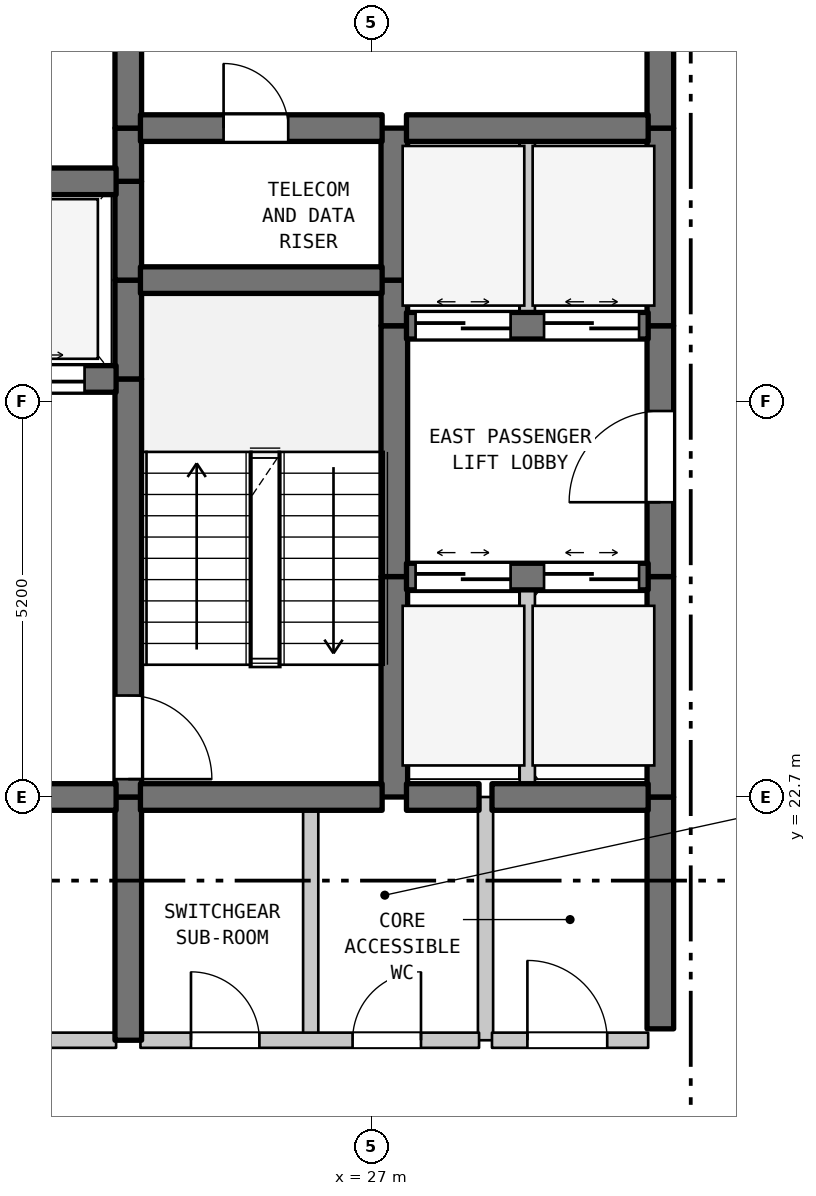
"""IFC4 building model, lengths in metres.
Left out: names, types, materials, properties, quantities, classifications, styles, units other than length and angle.
Written with IfcOpenShell. Run it as: python <this file> out.ifc"""

import sys

from ifc_helpers import new_model, si_unit, direction, frame, frame_2d, origin, place, context, subcontext, project, spatial, rectangle, extrude, element, fill, save


model = new_model("IFC4")
c1 = context("Model", 3, precision=1e-05, world=origin(), true_north=direction((0.0, 1.0)))
c2 = subcontext(c1, "Body", "Model", "MODEL_VIEW")
j1 = project(units=[si_unit("LENGTHUNIT", "METRE"), si_unit("PLANEANGLEUNIT", "RADIAN")], contexts=[c1])
p1 = place(None, origin())
s1 = spatial("IfcSite", under=j1, at=p1, CompositionType="ELEMENT")
p2 = place(p1, origin())
s2 = spatial("IfcBuilding", under=s1, at=p2, CompositionType="ELEMENT")
p3 = place(p2, frame((0.0, 0.0, 38.8)))
s3 = spatial("IfcBuildingStorey", under=s2, at=p3, CompositionType="ELEMENT", Elevation=38.8)
p4 = place(p3, frame((23.8, 19.5, 0.0), z_axis=(0.0, 0.0, 1.0), x_axis=(0.0, 1.0, 0.0)))
e1 = element("IfcWall", 1, at=p4, inside=s3, PredefinedType="SHEAR", context=c2, shape_type="SweptSolid", body=[
    extrude(rectangle(XDim=3.2, YDim=0.35, at=frame_2d((1.6, 0.0))), origin(), (0.0, 0.0, 1.0), 3.385),
])
p5 = place(p3, frame((23.8, 22.7, 0.0), z_axis=(0.0, 0.0, 1.0), x_axis=(0.0, 1.0, 0.0)))
e2 = element("IfcWall", 2, at=p5, inside=s3, PredefinedType="SHEAR", context=c2, shape_type="SweptSolid", body=[
    extrude(rectangle(XDim=5.5, YDim=0.35, at=frame_2d((2.75, 0.0))), origin(), (0.0, 0.0, 1.0), 3.385),
])
p6 = place(p5, frame((0.235, 0.0, 0.0)))
e3 = element("IfcOpeningElement", 3, at=p6, cuts=e2, PredefinedType="OPENING", context=c2, shape_type="SweptSolid", body=[
    extrude(rectangle(XDim=1.1, YDim=2.15, at=frame_2d((0.55, 1.075))), frame((0.0, 0.185, 0.0), z_axis=(0.0, -1.0, 0.0), x_axis=(1.0, 0.0, 0.0)), (0.0, 0.0, 1.0), 0.37),
])
for number, where, z_axis, x_axis in (
    (4, (23.8, 28.2, 0.0), (0.0, 0.0, 1.0), (0.0, 1.0, 0.0)),
    (5, (23.8, 29.5, 0.0), (0.0, 0.0, 1.0), (0.0, 1.0, 0.0)),
):
    element("IfcWall", number, at=place(p3, frame(where, z_axis=z_axis, x_axis=x_axis)), inside=s3, PredefinedType="SHEAR", context=c2, shape_type="SweptSolid", body=[
        extrude(rectangle(XDim=1.3, YDim=0.35, at=frame_2d((0.65, 0.0))), origin(), (0.0, 0.0, 1.0), 3.385),
    ])
p7 = place(p3, frame((23.8, 30.8, 0.0), z_axis=(0.0, 0.0, 1.0), x_axis=(0.0, 1.0, 0.0)))
e6 = element("IfcWall", 6, at=p7, inside=s3, PredefinedType="SHEAR", context=c2, shape_type="SweptSolid", body=[
    extrude(rectangle(XDim=0.7, YDim=0.35, at=frame_2d((0.35, 0.0))), origin(), (0.0, 0.0, 1.0), 3.385),
])
p8 = place(p3, frame((23.8, 31.5, 0.0), z_axis=(0.0, 0.0, 1.0), x_axis=(0.0, 1.0, 0.0)))
e7 = element("IfcWall", 7, at=p8, inside=s3, PredefinedType="SHEAR", context=c2, shape_type="SweptSolid", body=[
    extrude(rectangle(XDim=3.5, YDim=0.35, at=frame_2d((1.75, 0.0))), origin(), (0.0, 0.0, 1.0), 3.385),
])
p9 = place(p8, frame((1.127, 0.0, 0.0)))
e8 = element("IfcOpeningElement", 8, at=p9, cuts=e7, PredefinedType="OPENING", context=c2, shape_type="SweptSolid", body=[
    extrude(rectangle(XDim=1.1, YDim=2.15, at=frame_2d((0.55, 1.075))), frame((0.0, 0.185, 0.0), z_axis=(0.0, -1.0, 0.0), x_axis=(1.0, 0.0, 0.0)), (0.0, 0.0, 1.0), 0.37),
])
p10 = place(p3, frame((26.2, 19.5, 0.0), z_axis=(0.0, 0.0, 1.0), x_axis=(0.0, 1.0, 0.0)))
e9 = element("IfcWall", 9, at=p10, inside=s3, PredefinedType="STANDARD", context=c2, shape_type="SweptSolid", body=[
    extrude(rectangle(XDim=3.2, YDim=0.2, at=frame_2d((1.6, 0.0))), origin(), (0.0, 0.0, 1.0), 3.385),
])
p11 = place(p3, frame((27.3, 22.7, 0.0), z_axis=(0.0, 0.0, 1.0), x_axis=(0.0, 1.0, 0.0)))
e10 = element("IfcWall", 10, at=p11, inside=s3, PredefinedType="SHEAR", context=c2, shape_type="SweptSolid", body=[
    extrude(rectangle(XDim=2.9, YDim=0.35, at=frame_2d((1.45, 0.0))), origin(), (0.0, 0.0, 1.0), 3.385),
])
p12 = place(p3, frame((27.3, 25.6, 0.0), z_axis=(0.0, 0.0, 1.0), x_axis=(0.0, 1.0, 0.0)))
e11 = element("IfcWall", 11, at=p12, inside=s3, PredefinedType="SHEAR", context=c2, shape_type="SweptSolid", body=[
    extrude(rectangle(XDim=3.3, YDim=0.35, at=frame_2d((1.65, 0.0))), origin(), (0.0, 0.0, 1.0), 3.385),
])
p13 = place(p3, frame((27.3, 28.9, 0.0), z_axis=(0.0, 0.0, 1.0), x_axis=(0.0, 1.0, 0.0)))
e12 = element("IfcWall", 12, at=p13, inside=s3, PredefinedType="SHEAR", context=c2, shape_type="SweptSolid", body=[
    extrude(rectangle(XDim=0.6, YDim=0.35, at=frame_2d((0.3, 0.0))), origin(), (0.0, 0.0, 1.0), 3.385),
])
p14 = place(p3, frame((27.3, 29.5, 0.0), z_axis=(0.0, 0.0, 1.0), x_axis=(0.0, 1.0, 0.0)))
e13 = element("IfcWall", 13, at=p14, inside=s3, PredefinedType="SHEAR", context=c2, shape_type="SweptSolid", body=[
    extrude(rectangle(XDim=2.0, YDim=0.35, at=frame_2d((1.0, 0.0))), origin(), (0.0, 0.0, 1.0), 3.385),
])
p15 = place(p3, frame((28.5, 19.5, 0.0), z_axis=(0.0, 0.0, 1.0), x_axis=(0.0, 1.0, 0.0)))
e14 = element("IfcWall", 14, at=p15, inside=s3, PredefinedType="STANDARD", context=c2, shape_type="SweptSolid", body=[
    extrude(rectangle(XDim=3.2, YDim=0.2, at=frame_2d((1.6, 0.0))), origin(), (0.0, 0.0, 1.0), 3.385),
])
p16 = place(p3, frame((29.05, 22.7, 0.0), z_axis=(0.0, 0.0, 1.0), x_axis=(0.0, 1.0, 0.0)))
e15 = element("IfcWall", 15, at=p16, inside=s3, PredefinedType="STANDARD", context=c2, shape_type="SweptSolid", body=[
    extrude(rectangle(XDim=2.9, YDim=0.2, at=frame_2d((1.45, 0.0))), origin(), (0.0, 0.0, 1.0), 3.385),
])
p17 = place(p3, frame((29.05, 28.9, 0.0), z_axis=(0.0, 0.0, 1.0), x_axis=(0.0, 1.0, 0.0)))
e16 = element("IfcWall", 16, at=p17, inside=s3, PredefinedType="STANDARD", context=c2, shape_type="SweptSolid", body=[
    extrude(rectangle(XDim=2.6, YDim=0.2, at=frame_2d((1.3, 0.0))), origin(), (0.0, 0.0, 1.0), 3.385),
])
p18 = place(p3, frame((30.8, 19.65, 0.0), z_axis=(0.0, 0.0, 1.0), x_axis=(0.0, 1.0, 0.0)))
e17 = element("IfcWall", 17, at=p18, inside=s3, PredefinedType="SHEAR", context=c2, shape_type="SweptSolid", body=[
    extrude(rectangle(XDim=3.05, YDim=0.35, at=frame_2d((1.525, 0.0))), origin(), (0.0, 0.0, 1.0), 3.385),
])
p19 = place(p3, frame((30.8, 22.7, 0.0), z_axis=(0.0, 0.0, 1.0), x_axis=(0.0, 1.0, 0.0)))
e18 = element("IfcWall", 18, at=p19, inside=s3, PredefinedType="SHEAR", context=c2, shape_type="SweptSolid", body=[
    extrude(rectangle(XDim=2.9, YDim=0.35, at=frame_2d((1.45, 0.0))), origin(), (0.0, 0.0, 1.0), 3.385),
])
p20 = place(p3, frame((30.8, 25.6, 0.0), z_axis=(0.0, 0.0, 1.0), x_axis=(0.0, 1.0, 0.0)))
e19 = element("IfcWall", 19, at=p20, inside=s3, PredefinedType="SHEAR", context=c2, shape_type="SweptSolid", body=[
    extrude(rectangle(XDim=3.3, YDim=0.35, at=frame_2d((1.65, 0.0))), origin(), (0.0, 0.0, 1.0), 3.385),
])
p21 = place(p20, frame((0.978, 0.0, 0.0)))
e20 = element("IfcOpeningElement", 20, at=p21, cuts=e19, PredefinedType="OPENING", context=c2, shape_type="SweptSolid", body=[
    extrude(rectangle(XDim=1.2, YDim=2.2, at=frame_2d((0.6, 1.1))), frame((0.0, 0.185, 0.0), z_axis=(0.0, -1.0, 0.0), x_axis=(1.0, 0.0, 0.0)), (0.0, 0.0, 1.0), 0.37),
])
p22 = place(p3, frame((30.8, 28.9, 0.0), z_axis=(0.0, 0.0, 1.0), x_axis=(0.0, 1.0, 0.0)))
e21 = element("IfcWall", 21, at=p22, inside=s3, PredefinedType="SHEAR", context=c2, shape_type="SweptSolid", body=[
    extrude(rectangle(XDim=2.6, YDim=0.35, at=frame_2d((1.3, 0.0))), origin(), (0.0, 0.0, 1.0), 3.385),
])
p23 = place(p3, frame((30.8, 31.5, 0.0), z_axis=(0.0, 0.0, 1.0), x_axis=(0.0, 1.0, 0.0)))
e22 = element("IfcWall", 22, at=p23, inside=s3, PredefinedType="SHEAR", context=c2, shape_type="SweptSolid", body=[
    extrude(rectangle(XDim=3.5, YDim=0.35, at=frame_2d((1.75, 0.0))), origin(), (0.0, 0.0, 1.0), 3.385),
])
p24 = place(p23, frame((1.15, 0.0, 0.0)))
e23 = element("IfcOpeningElement", 23, at=p24, cuts=e22, PredefinedType="OPENING", context=c2, shape_type="SweptSolid", body=[
    extrude(rectangle(XDim=1.2, YDim=2.2, at=frame_2d((0.6, 1.1))), frame((0.0, 0.185, 0.0), z_axis=(0.0, -1.0, 0.0), x_axis=(1.0, 0.0, 0.0)), (0.0, 0.0, 1.0), 0.37),
])
p25 = place(p3, frame((19.16, 19.5, 0.0), z_axis=(0.0, 0.0, 1.0), x_axis=(1.0, 0.0, 0.0)))
e24 = element("IfcWall", 24, at=p25, inside=s3, PredefinedType="STANDARD", context=c2, shape_type="SweptSolid", body=[
    extrude(rectangle(XDim=4.48, YDim=0.2, at=frame_2d((2.24, 0.0))), origin(), (0.0, 0.0, 1.0), 3.385),
])
p26 = place(p25, frame((1.64, 0.0, 0.0)))
e25 = element("IfcOpeningElement", 25, at=p26, cuts=e24, PredefinedType="OPENING", context=c2, shape_type="SweptSolid", body=[
    extrude(rectangle(XDim=1.2, YDim=2.2, at=frame_2d((0.6, 1.1))), frame((0.0, 0.11, 0.0), z_axis=(0.0, -1.0, 0.0), x_axis=(1.0, 0.0, 0.0)), (0.0, 0.0, 1.0), 0.22),
])
p27 = place(p3, frame((23.96, 19.5, 0.0), z_axis=(0.0, 0.0, 1.0), x_axis=(1.0, 0.0, 0.0)))
e26 = element("IfcWall", 26, at=p27, inside=s3, PredefinedType="STANDARD", context=c2, shape_type="SweptSolid", body=[
    extrude(rectangle(XDim=4.455, YDim=0.2, at=frame_2d((2.228, 0.0))), origin(), (0.0, 0.0, 1.0), 3.385),
])
p28 = place(p27, frame((0.665, 0.0, 0.0)))
e27 = element("IfcOpeningElement", 27, at=p28, cuts=e26, PredefinedType="OPENING", context=c2, shape_type="SweptSolid", body=[
    extrude(rectangle(XDim=0.9, YDim=2.15, at=frame_2d((0.45, 1.075))), frame((0.0, 0.11, 0.0), z_axis=(0.0, -1.0, 0.0), x_axis=(1.0, 0.0, 0.0)), (0.0, 0.0, 1.0), 0.22),
])
p29 = place(p27, frame((2.791, 0.0, 0.0)))
e28 = element("IfcOpeningElement", 28, at=p29, cuts=e26, PredefinedType="OPENING", context=c2, shape_type="SweptSolid", body=[
    extrude(rectangle(XDim=0.9, YDim=2.15, at=frame_2d((0.45, 1.075))), frame((0.0, 0.11, 0.0), z_axis=(0.0, -1.0, 0.0), x_axis=(1.0, 0.0, 0.0)), (0.0, 0.0, 1.0), 0.22),
])
p30 = place(p3, frame((28.585, 19.5, 0.0), z_axis=(0.0, 0.0, 1.0), x_axis=(1.0, 0.0, 0.0)))
e29 = element("IfcWall", 29, at=p30, inside=s3, PredefinedType="STANDARD", context=c2, shape_type="SweptSolid", body=[
    extrude(rectangle(XDim=2.055, YDim=0.2, at=frame_2d((1.027, 0.0))), origin(), (0.0, 0.0, 1.0), 3.385),
])
p31 = place(p30, frame((0.466, 0.0, 0.0)))
e30 = element("IfcOpeningElement", 30, at=p31, cuts=e29, PredefinedType="OPENING", context=c2, shape_type="SweptSolid", body=[
    extrude(rectangle(XDim=1.05, YDim=2.15, at=frame_2d((0.525, 1.075))), frame((0.0, 0.11, 0.0), z_axis=(0.0, -1.0, 0.0), x_axis=(1.0, 0.0, 0.0)), (0.0, 0.0, 1.0), 0.22),
])
p32 = place(p3, frame((19.16, 22.7, 0.0), z_axis=(0.0, 0.0, 1.0), x_axis=(1.0, 0.0, 0.0)))
e31 = element("IfcWall", 31, at=p32, inside=s3, PredefinedType="SHEAR", context=c2, shape_type="SweptSolid", body=[
    extrude(rectangle(XDim=4.48, YDim=0.35, at=frame_2d((2.24, 0.0))), origin(), (0.0, 0.0, 1.0), 3.385),
])
p33 = place(p32, frame((1.64, 0.0, 0.0)))
e32 = element("IfcOpeningElement", 32, at=p33, cuts=e31, PredefinedType="OPENING", context=c2, shape_type="SweptSolid", body=[
    extrude(rectangle(XDim=1.2, YDim=2.2, at=frame_2d((0.6, 1.1))), frame((0.0, 0.185, 0.0), z_axis=(0.0, -1.0, 0.0), x_axis=(1.0, 0.0, 0.0)), (0.0, 0.0, 1.0), 0.37),
])
p34 = place(p3, frame((23.96, 22.7, 0.0), z_axis=(0.0, 0.0, 1.0), x_axis=(1.0, 0.0, 0.0)))
e33 = element("IfcWall", 33, at=p34, inside=s3, PredefinedType="SHEAR", context=c2, shape_type="SweptSolid", body=[
    extrude(rectangle(XDim=3.18, YDim=0.35, at=frame_2d((1.59, 0.0))), origin(), (0.0, 0.0, 1.0), 3.385),
])
p35 = place(p3, frame((27.46, 22.7, 0.0), z_axis=(0.0, 0.0, 1.0), x_axis=(1.0, 0.0, 0.0)))
e34 = element("IfcWall", 34, at=p35, inside=s3, PredefinedType="SHEAR", context=c2, shape_type="SweptSolid", body=[
    extrude(rectangle(XDim=0.955, YDim=0.35, at=frame_2d((0.478, 0.0))), origin(), (0.0, 0.0, 1.0), 3.385),
])
p36 = place(p3, frame((28.585, 22.7, 0.0), z_axis=(0.0, 0.0, 1.0), x_axis=(1.0, 0.0, 0.0)))
e35 = element("IfcWall", 35, at=p36, inside=s3, PredefinedType="SHEAR", context=c2, shape_type="SweptSolid", body=[
    extrude(rectangle(XDim=2.055, YDim=0.35, at=frame_2d((1.027, 0.0))), origin(), (0.0, 0.0, 1.0), 3.385),
])
p37 = place(p3, frame((27.46, 25.6, 0.0), z_axis=(0.0, 0.0, 1.0), x_axis=(1.0, 0.0, 0.0)))
e36 = element("IfcWall", 36, at=p37, inside=s3, PredefinedType="SHEAR", context=c2, shape_type="SweptSolid", body=[
    extrude(rectangle(XDim=3.18, YDim=0.35, at=frame_2d((1.59, 0.0))), origin(), (0.0, 0.0, 1.0), 3.385),
])
p38 = place(p37, frame((0.12, 0.0, 0.0)))
e37 = element("IfcOpeningElement", 37, at=p38, cuts=e36, PredefinedType="OPENING", context=c2, shape_type="SweptSolid", body=[
    extrude(rectangle(XDim=1.25, YDim=2.2, at=frame_2d((0.625, 1.1))), frame((0.0, 0.185, 0.0), z_axis=(0.0, -1.0, 0.0), x_axis=(1.0, 0.0, 0.0)), (0.0, 0.0, 1.0), 0.37),
])
p39 = place(p37, frame((1.81, 0.0, 0.0)))
e38 = element("IfcOpeningElement", 38, at=p39, cuts=e36, PredefinedType="OPENING", context=c2, shape_type="SweptSolid", body=[
    extrude(rectangle(XDim=1.25, YDim=2.2, at=frame_2d((0.625, 1.1))), frame((0.0, 0.185, 0.0), z_axis=(0.0, -1.0, 0.0), x_axis=(1.0, 0.0, 0.0)), (0.0, 0.0, 1.0), 0.37),
])
p40 = place(p3, frame((19.16, 28.2, 0.0), z_axis=(0.0, 0.0, 1.0), x_axis=(1.0, 0.0, 0.0)))
e39 = element("IfcWall", 39, at=p40, inside=s3, PredefinedType="SHEAR", context=c2, shape_type="SweptSolid", body=[
    extrude(rectangle(XDim=4.48, YDim=0.35, at=frame_2d((2.24, 0.0))), origin(), (0.0, 0.0, 1.0), 3.385),
])
p41 = place(p40, frame((0.415, 0.0, 0.0)))
e40 = element("IfcOpeningElement", 40, at=p41, cuts=e39, PredefinedType="OPENING", context=c2, shape_type="SweptSolid", body=[
    extrude(rectangle(XDim=1.25, YDim=2.2, at=frame_2d((0.625, 1.1))), frame((0.0, 0.185, 0.0), z_axis=(0.0, -1.0, 0.0), x_axis=(1.0, 0.0, 0.0)), (0.0, 0.0, 1.0), 0.37),
])
p42 = place(p40, frame((2.815, 0.0, 0.0)))
e41 = element("IfcOpeningElement", 41, at=p42, cuts=e39, PredefinedType="OPENING", context=c2, shape_type="SweptSolid", body=[
    extrude(rectangle(XDim=1.25, YDim=2.2, at=frame_2d((0.625, 1.1))), frame((0.0, 0.185, 0.0), z_axis=(0.0, -1.0, 0.0), x_axis=(1.0, 0.0, 0.0)), (0.0, 0.0, 1.0), 0.37),
])
p43 = place(p3, frame((27.46, 28.9, 0.0), z_axis=(0.0, 0.0, 1.0), x_axis=(1.0, 0.0, 0.0)))
e42 = element("IfcWall", 42, at=p43, inside=s3, PredefinedType="SHEAR", context=c2, shape_type="SweptSolid", body=[
    extrude(rectangle(XDim=3.18, YDim=0.35, at=frame_2d((1.59, 0.0))), origin(), (0.0, 0.0, 1.0), 3.385),
])
p44 = place(p43, frame((0.12, 0.0, 0.0)))
e43 = element("IfcOpeningElement", 43, at=p44, cuts=e42, PredefinedType="OPENING", context=c2, shape_type="SweptSolid", body=[
    extrude(rectangle(XDim=1.25, YDim=2.2, at=frame_2d((0.625, 1.1))), frame((0.0, 0.185, 0.0), z_axis=(0.0, -1.0, 0.0), x_axis=(1.0, 0.0, 0.0)), (0.0, 0.0, 1.0), 0.37),
])
p45 = place(p43, frame((1.81, 0.0, 0.0)))
e44 = element("IfcOpeningElement", 44, at=p45, cuts=e42, PredefinedType="OPENING", context=c2, shape_type="SweptSolid", body=[
    extrude(rectangle(XDim=1.25, YDim=2.2, at=frame_2d((0.625, 1.1))), frame((0.0, 0.185, 0.0), z_axis=(0.0, -1.0, 0.0), x_axis=(1.0, 0.0, 0.0)), (0.0, 0.0, 1.0), 0.37),
])
p46 = place(p3, frame((23.96, 29.5, 0.0), z_axis=(0.0, 0.0, 1.0), x_axis=(1.0, 0.0, 0.0)))
e45 = element("IfcWall", 45, at=p46, inside=s3, PredefinedType="SHEAR", context=c2, shape_type="SweptSolid", body=[
    extrude(rectangle(XDim=3.18, YDim=0.35, at=frame_2d((1.59, 0.0))), origin(), (0.0, 0.0, 1.0), 3.385),
])
p47 = place(p3, frame((19.16, 30.8, 0.0), z_axis=(0.0, 0.0, 1.0), x_axis=(1.0, 0.0, 0.0)))
e46 = element("IfcWall", 46, at=p47, inside=s3, PredefinedType="SHEAR", context=c2, shape_type="SweptSolid", body=[
    extrude(rectangle(XDim=4.48, YDim=0.35, at=frame_2d((2.24, 0.0))), origin(), (0.0, 0.0, 1.0), 3.385),
])
p48 = place(p3, frame((23.96, 31.5, 0.0), z_axis=(0.0, 0.0, 1.0), x_axis=(1.0, 0.0, 0.0)))
e47 = element("IfcWall", 47, at=p48, inside=s3, PredefinedType="SHEAR", context=c2, shape_type="SweptSolid", body=[
    extrude(rectangle(XDim=3.18, YDim=0.35, at=frame_2d((1.59, 0.0))), origin(), (0.0, 0.0, 1.0), 3.385),
])
p49 = place(p48, frame((1.094, 0.0, 0.0)))
e48 = element("IfcOpeningElement", 48, at=p49, cuts=e47, PredefinedType="OPENING", context=c2, shape_type="SweptSolid", body=[
    extrude(rectangle(XDim=0.85, YDim=2.1, at=frame_2d((0.425, 1.05))), frame((0.0, 0.185, 0.0), z_axis=(0.0, -1.0, 0.0), x_axis=(1.0, 0.0, 0.0)), (0.0, 0.0, 1.0), 0.37),
])
p50 = place(p3, frame((27.46, 31.5, 0.0), z_axis=(0.0, 0.0, 1.0), x_axis=(1.0, 0.0, 0.0)))
e49 = element("IfcWall", 49, at=p50, inside=s3, PredefinedType="SHEAR", context=c2, shape_type="SweptSolid", body=[
    extrude(rectangle(XDim=3.18, YDim=0.35, at=frame_2d((1.59, 0.0))), origin(), (0.0, 0.0, 1.0), 3.385),
])
p51 = place(p6, frame((1.1, 0.0, 0.0), z_axis=(0.0, 0.0, 1.0), x_axis=(-1.0, 0.0, 0.0)))
e50 = element("IfcDoor", 50, at=p51, inside=s3, OperationType="SINGLE_SWING_LEFT", PredefinedType="DOOR", context=c2, shape_type="SweptSolid", body=[
    extrude(rectangle(XDim=1.1, YDim=2.15, at=frame_2d((0.55, 1.075))), frame((0.0, 0.025, 0.0), z_axis=(0.0, -1.0, 0.0), x_axis=(1.0, 0.0, 0.0)), (0.0, 0.0, 1.0), 0.05),
])
fill(e3, e50)
p52 = place(p21, origin())
e51 = element("IfcDoor", 51, at=p52, inside=s3, OperationType="SINGLE_SWING_LEFT", PredefinedType="DOOR", context=c2, shape_type="SweptSolid", body=[
    extrude(rectangle(XDim=1.2, YDim=2.2, at=frame_2d((0.6, 1.1))), frame((0.0, 0.025, 0.0), z_axis=(0.0, -1.0, 0.0), x_axis=(1.0, 0.0, 0.0)), (0.0, 0.0, 1.0), 0.05),
])
fill(e20, e51)
p53 = place(p28, origin())
e52 = element("IfcDoor", 52, at=p53, inside=s3, OperationType="SINGLE_SWING_LEFT", PredefinedType="DOOR", context=c2, shape_type="SweptSolid", body=[
    extrude(rectangle(XDim=0.9, YDim=2.15, at=frame_2d((0.45, 1.075))), frame((0.0, 0.025, 0.0), z_axis=(0.0, -1.0, 0.0), x_axis=(1.0, 0.0, 0.0)), (0.0, 0.0, 1.0), 0.05),
])
fill(e27, e52)
p54 = place(p29, origin())
e53 = element("IfcDoor", 53, at=p54, inside=s3, OperationType="SINGLE_SWING_RIGHT", PredefinedType="DOOR", context=c2, shape_type="SweptSolid", body=[
    extrude(rectangle(XDim=0.9, YDim=2.15, at=frame_2d((0.45, 1.075))), frame((0.0, 0.025, 0.0), z_axis=(0.0, -1.0, 0.0), x_axis=(1.0, 0.0, 0.0)), (0.0, 0.0, 1.0), 0.05),
])
fill(e28, e53)
p55 = place(p31, origin())
e54 = element("IfcDoor", 54, at=p55, inside=s3, OperationType="SINGLE_SWING_LEFT", PredefinedType="DOOR", context=c2, shape_type="SweptSolid", body=[
    extrude(rectangle(XDim=1.05, YDim=2.15, at=frame_2d((0.525, 1.075))), frame((0.0, 0.025, 0.0), z_axis=(0.0, -1.0, 0.0), x_axis=(1.0, 0.0, 0.0)), (0.0, 0.0, 1.0), 0.05),
])
fill(e30, e54)
p56 = place(p38, origin())
e55 = element("IfcDoor", 55, at=p56, inside=s3, OperationType="DOUBLE_DOOR_SLIDING", PredefinedType="DOOR", context=c2, shape_type="SweptSolid", body=[
    extrude(rectangle(XDim=1.25, YDim=2.2, at=frame_2d((0.625, 1.1))), frame((0.0, 0.025, 0.0), z_axis=(0.0, -1.0, 0.0), x_axis=(1.0, 0.0, 0.0)), (0.0, 0.0, 1.0), 0.05),
])
fill(e37, e55)
p57 = place(p39, origin())
e56 = element("IfcDoor", 56, at=p57, inside=s3, OperationType="DOUBLE_DOOR_SLIDING", PredefinedType="DOOR", context=c2, shape_type="SweptSolid", body=[
    extrude(rectangle(XDim=1.25, YDim=2.2, at=frame_2d((0.625, 1.1))), frame((0.0, 0.025, 0.0), z_axis=(0.0, -1.0, 0.0), x_axis=(1.0, 0.0, 0.0)), (0.0, 0.0, 1.0), 0.05),
])
fill(e38, e56)
p58 = place(p42, origin())
e57 = element("IfcDoor", 57, at=p58, inside=s3, OperationType="DOUBLE_DOOR_SLIDING", PredefinedType="DOOR", context=c2, shape_type="SweptSolid", body=[
    extrude(rectangle(XDim=1.25, YDim=2.2, at=frame_2d((0.625, 1.1))), frame((0.0, 0.025, 0.0), z_axis=(0.0, -1.0, 0.0), x_axis=(1.0, 0.0, 0.0)), (0.0, 0.0, 1.0), 0.05),
])
fill(e41, e57)
p59 = place(p44, origin())
e58 = element("IfcDoor", 58, at=p59, inside=s3, OperationType="DOUBLE_DOOR_SLIDING", PredefinedType="DOOR", context=c2, shape_type="SweptSolid", body=[
    extrude(rectangle(XDim=1.25, YDim=2.2, at=frame_2d((0.625, 1.1))), frame((0.0, 0.025, 0.0), z_axis=(0.0, -1.0, 0.0), x_axis=(1.0, 0.0, 0.0)), (0.0, 0.0, 1.0), 0.05),
])
fill(e43, e58)
p60 = place(p45, origin())
e59 = element("IfcDoor", 59, at=p60, inside=s3, OperationType="DOUBLE_DOOR_SLIDING", PredefinedType="DOOR", context=c2, shape_type="SweptSolid", body=[
    extrude(rectangle(XDim=1.25, YDim=2.2, at=frame_2d((0.625, 1.1))), frame((0.0, 0.025, 0.0), z_axis=(0.0, -1.0, 0.0), x_axis=(1.0, 0.0, 0.0)), (0.0, 0.0, 1.0), 0.05),
])
fill(e44, e59)
p61 = place(p49, origin())
e60 = element("IfcDoor", 60, at=p61, inside=s3, OperationType="SINGLE_SWING_LEFT", PredefinedType="DOOR", context=c2, shape_type="SweptSolid", body=[
    extrude(rectangle(XDim=0.85, YDim=2.1, at=frame_2d((0.425, 1.05))), frame((0.0, 0.025, 0.0), z_axis=(0.0, -1.0, 0.0), x_axis=(1.0, 0.0, 0.0)), (0.0, 0.0, 1.0), 0.05),
])
fill(e48, e60)
save(model, sys.argv[1])
